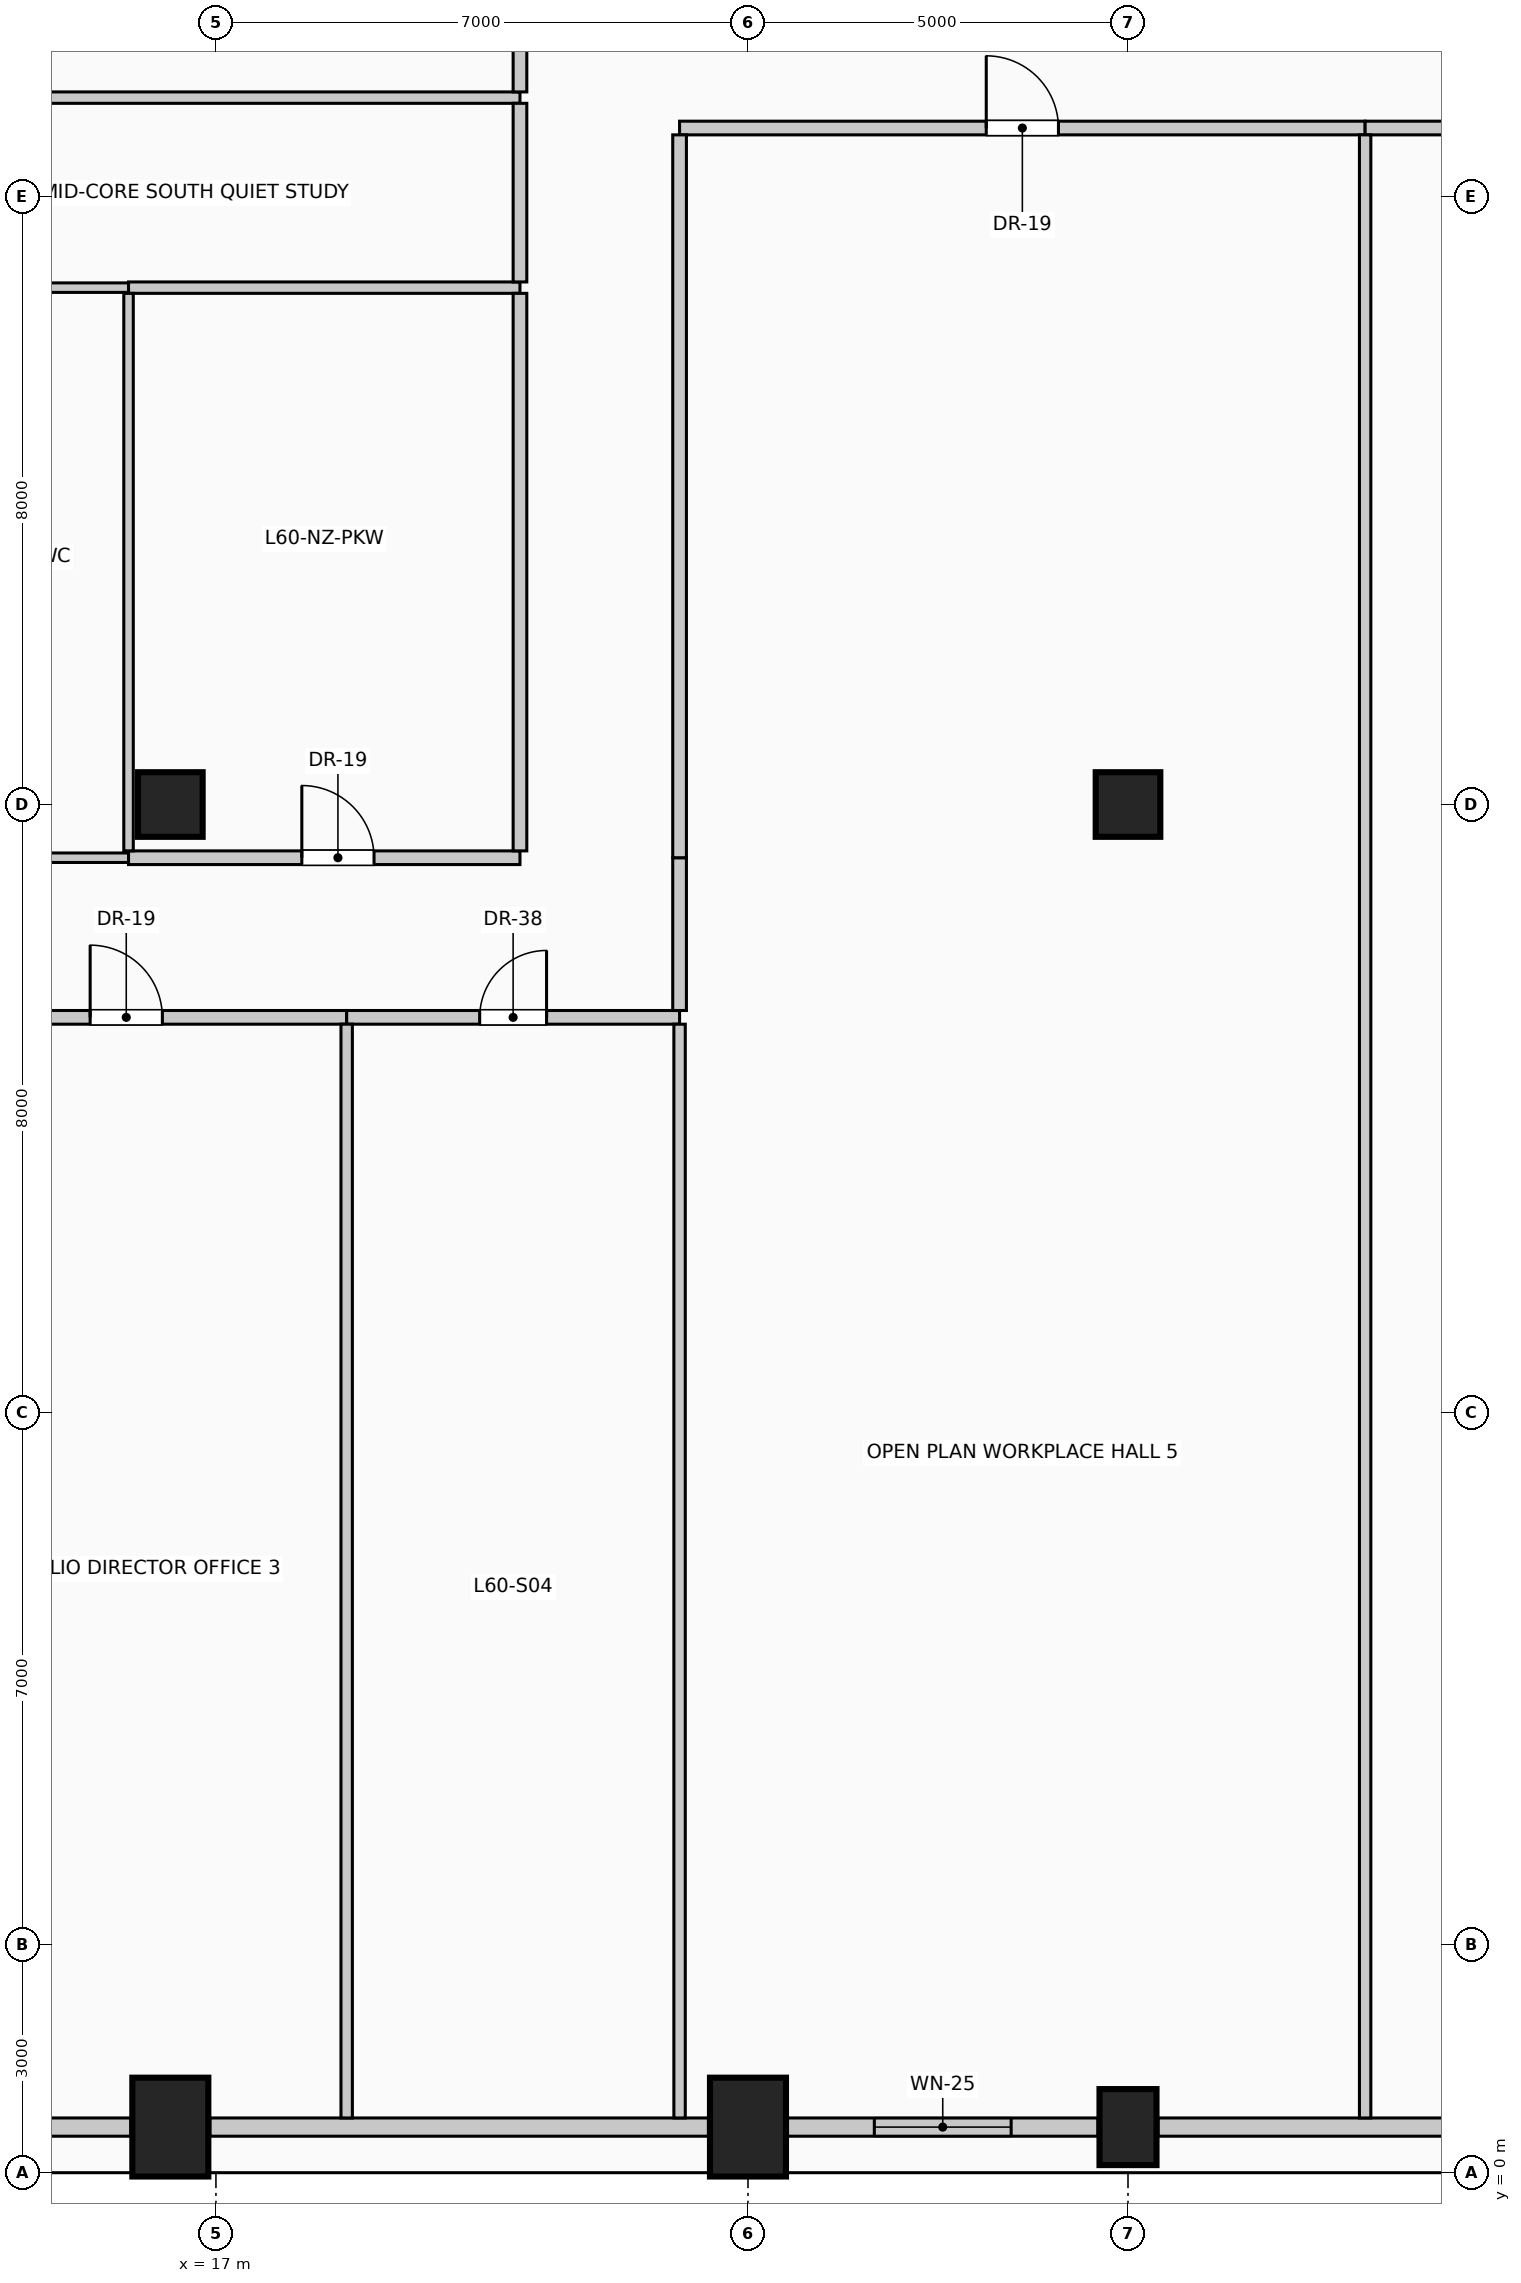
"""IFC4 building model, lengths in metres.
Left out: names, types, materials, properties, quantities, classifications, styles, units other than length and angle.
Written with IfcOpenShell. Run it as: python <this file> out.ifc"""

import sys

from ifc_helpers import new_model, si_unit, direction, frame, frame_2d, origin, origin_2d, place, context, subcontext, project, spatial, rectangle, circle, extrude, element, fill, save


model = new_model("IFC4")
c1 = context("Model", 3, precision=1e-05, world=origin(), true_north=direction((0.0, 1.0)))
c2 = subcontext(c1, "Body", "Model", "MODEL_VIEW")
j1 = project(units=[si_unit("LENGTHUNIT", "METRE"), si_unit("PLANEANGLEUNIT", "RADIAN")], contexts=[c1])
p1 = place(None, origin())
s1 = spatial("IfcSite", under=j1, at=p1, CompositionType="ELEMENT")
p2 = place(p1, origin())
s2 = spatial("IfcBuilding", under=s1, at=p2, CompositionType="ELEMENT")
p3 = place(p2, frame((0.0, 0.0, 248.6)))
s3 = spatial("IfcBuildingStorey", under=s2, at=p3, CompositionType="ELEMENT", Elevation=248.6)
for number, where, z_axis, x_axis in (
    (1, (16.4, 0.6, 0.0), (0.0, 0.0, 1.0), (1.0, 0.0, 0.0)),
    (2, (24.0, 0.6, 0.0), (0.0, 0.0, 1.0), (1.0, 0.0, 0.0)),
):
    element("IfcColumn", number, at=place(p3, frame(where, z_axis=z_axis, x_axis=x_axis)), inside=s3, PredefinedType="COLUMN", context=c2, shape_type="SweptSolid", body=[
        extrude(rectangle(XDim=1.0, YDim=1.3, at=origin_2d()), origin(), (0.0, 0.0, 1.0), 4.0),
    ])
p4 = place(p3, frame((29.0, 0.6, 0.0), z_axis=(0.0, 0.0, 1.0), x_axis=(1.0, 0.0, 0.0)))
e3 = element("IfcColumn", 3, at=p4, inside=s3, PredefinedType="COLUMN", context=c2, shape_type="SweptSolid", body=[
    extrude(rectangle(XDim=0.75, YDim=1.0, at=origin_2d()), origin(), (0.0, 0.0, 1.0), 4.0),
])
for number, where, z_axis, x_axis in (
    (4, (16.4, 18.0, 0.0), (0.0, 0.0, 1.0), (1.0, 0.0, 0.0)),
    (5, (29.0, 18.0, 0.0), (0.0, 0.0, 1.0), (1.0, 0.0, 0.0)),
):
    element("IfcColumn", number, at=place(p3, frame(where, z_axis=z_axis, x_axis=x_axis)), inside=s3, PredefinedType="COLUMN", context=c2, shape_type="SweptSolid", body=[
        extrude(circle(Radius=0.425, at=origin_2d()), origin(), (0.0, 0.0, 1.0), 4.0),
    ])
p5 = place(p3, frame((15.88, 0.6, 0.0), z_axis=(0.0, 0.0, 1.0), x_axis=(-1.0, 0.0, 0.0)))
e6 = element("IfcWall", 6, at=p5, inside=s3, PredefinedType="SOLIDWALL", context=c2, shape_type="SweptSolid", body=[
    extrude(rectangle(XDim=1.485, YDim=0.24, at=frame_2d((0.742, 0.0))), origin(), (0.0, 0.0, 1.0), 3.0),
])
p6 = place(p3, frame((23.48, 0.6, 0.0), z_axis=(0.0, 0.0, 1.0), x_axis=(-1.0, 0.0, 0.0)))
e7 = element("IfcWall", 7, at=p6, inside=s3, PredefinedType="SOLIDWALL", context=c2, shape_type="SweptSolid", body=[
    extrude(rectangle(XDim=6.56, YDim=0.24, at=frame_2d((3.28, 0.0))), origin(), (0.0, 0.0, 1.0), 3.0),
])
p7 = place(p3, frame((28.605, 0.6, 0.0), z_axis=(0.0, 0.0, 1.0), x_axis=(-1.0, 0.0, 0.0)))
e8 = element("IfcWall", 8, at=p7, inside=s3, PredefinedType="SOLIDWALL", context=c2, shape_type="SweptSolid", body=[
    extrude(rectangle(XDim=4.085, YDim=0.24, at=frame_2d((2.042, 0.0))), origin(), (0.0, 0.0, 1.0), 3.0),
])
p8 = place(p7, frame((1.143, 0.0, 0.42)))
e9 = element("IfcOpeningElement", 9, at=p8, cuts=e8, PredefinedType="OPENING", context=c2, shape_type="SweptSolid", body=[
    extrude(rectangle(XDim=1.8, YDim=2.2, at=frame_2d((0.9, 1.1))), frame((0.0, 0.13, 0.0), z_axis=(0.0, -1.0, 0.0), x_axis=(1.0, 0.0, 0.0)), (0.0, 0.0, 1.0), 0.26),
])
p9 = place(p3, frame((33.48, 0.6, 0.0), z_axis=(0.0, 0.0, 1.0), x_axis=(-1.0, 0.0, 0.0)))
e10 = element("IfcWall", 10, at=p9, inside=s3, PredefinedType="SOLIDWALL", context=c2, shape_type="SweptSolid", body=[
    extrude(rectangle(XDim=4.085, YDim=0.24, at=frame_2d((2.042, 0.0))), origin(), (0.0, 0.0, 1.0), 3.0),
])
p10 = place(p3, frame((12.92, 15.2, 0.0), z_axis=(0.0, 0.0, 1.0), x_axis=(1.0, 0.0, 0.0)))
e11 = element("IfcWall", 11, at=p10, inside=s3, PredefinedType="PARTITIONING", context=c2, shape_type="SweptSolid", body=[
    extrude(rectangle(XDim=5.8, YDim=0.18, at=frame_2d((2.9, 0.0))), origin(), (0.0, 0.0, 1.0), 3.75),
])
p11 = place(p10, frame((2.425, 0.0, 0.0)))
e12 = element("IfcOpeningElement", 12, at=p11, cuts=e11, PredefinedType="OPENING", context=c2, shape_type="SweptSolid", body=[
    extrude(rectangle(XDim=0.95, YDim=2.15, at=frame_2d((0.475, 1.075))), frame((0.0, 0.1, 0.0), z_axis=(0.0, -1.0, 0.0), x_axis=(1.0, 0.0, 0.0)), (0.0, 0.0, 1.0), 0.2),
])
p12 = place(p3, frame((18.72, 15.2, 0.0), z_axis=(0.0, 0.0, 1.0), x_axis=(1.0, 0.0, 0.0)))
e13 = element("IfcWall", 13, at=p12, inside=s3, PredefinedType="PARTITIONING", context=c2, shape_type="SweptSolid", body=[
    extrude(rectangle(XDim=4.38, YDim=0.18, at=frame_2d((2.19, 0.0))), origin(), (0.0, 0.0, 1.0), 3.75),
])
p13 = place(p12, frame((1.75, 0.0, 0.0)))
e14 = element("IfcOpeningElement", 14, at=p13, cuts=e13, PredefinedType="OPENING", context=c2, shape_type="SweptSolid", body=[
    extrude(rectangle(XDim=0.88, YDim=2.1, at=frame_2d((0.44, 1.05))), frame((0.0, 0.1, 0.0), z_axis=(0.0, -1.0, 0.0), x_axis=(1.0, 0.0, 0.0)), (0.0, 0.0, 1.0), 0.2),
])
p14 = place(p3, frame((9.8, 17.3, 0.0), z_axis=(0.0, 0.0, 1.0), x_axis=(1.0, 0.0, 0.0)))
e15 = element("IfcWall", 15, at=p14, inside=s3, PredefinedType="PARTITIONING", context=c2, shape_type="SweptSolid", body=[
    extrude(rectangle(XDim=6.05, YDim=0.125, at=frame_2d((3.025, 0.0))), origin(), (0.0, 0.0, 1.0), 3.75),
])
p15 = place(p14, frame((2.575, 0.0, 0.0)))
e16 = element("IfcOpeningElement", 16, at=p15, cuts=e15, PredefinedType="OPENING", context=c2, shape_type="SweptSolid", body=[
    extrude(rectangle(XDim=0.9, YDim=2.1, at=frame_2d((0.45, 1.05))), frame((0.0, 0.073, 0.0), z_axis=(0.0, -1.0, 0.0), x_axis=(1.0, 0.0, 0.0)), (0.0, 0.0, 1.0), 0.145),
])
p16 = place(p3, frame((15.85, 17.3, 0.0), z_axis=(0.0, 0.0, 1.0), x_axis=(1.0, 0.0, 0.0)))
e17 = element("IfcWall", 17, at=p16, inside=s3, PredefinedType="PARTITIONING", context=c2, shape_type="SweptSolid", body=[
    extrude(rectangle(XDim=5.15, YDim=0.18, at=frame_2d((2.575, 0.0))), origin(), (0.0, 0.0, 1.0), 3.75),
])
p17 = place(p16, frame((2.28, 0.0, 0.0)))
e18 = element("IfcOpeningElement", 18, at=p17, cuts=e17, PredefinedType="OPENING", context=c2, shape_type="SweptSolid", body=[
    extrude(rectangle(XDim=0.95, YDim=2.15, at=frame_2d((0.475, 1.075))), frame((0.0, 0.1, 0.0), z_axis=(0.0, -1.0, 0.0), x_axis=(1.0, 0.0, 0.0)), (0.0, 0.0, 1.0), 0.2),
])
p18 = place(p3, frame((12.2, 24.8, 0.0), z_axis=(0.0, 0.0, 1.0), x_axis=(1.0, 0.0, 0.0)))
e19 = element("IfcWall", 19, at=p18, inside=s3, PredefinedType="PARTITIONING", context=c2, shape_type="SweptSolid", body=[
    extrude(rectangle(XDim=3.65, YDim=0.125, at=frame_2d((1.825, 0.0))), origin(), (0.0, 0.0, 1.0), 3.75),
])
p19 = place(p3, frame((15.85, 24.8, 0.0), z_axis=(0.0, 0.0, 1.0), x_axis=(1.0, 0.0, 0.0)))
e20 = element("IfcWall", 20, at=p19, inside=s3, PredefinedType="PARTITIONING", context=c2, shape_type="SweptSolid", body=[
    extrude(rectangle(XDim=5.15, YDim=0.15, at=frame_2d((2.575, 0.0))), origin(), (0.0, 0.0, 1.0), 3.75),
])
p20 = place(p3, frame((23.1, 26.9, 0.0), z_axis=(0.0, 0.0, 1.0), x_axis=(1.0, 0.0, 0.0)))
e21 = element("IfcWall", 21, at=p20, inside=s3, PredefinedType="PARTITIONING", context=c2, shape_type="SweptSolid", body=[
    extrude(rectangle(XDim=9.02, YDim=0.18, at=frame_2d((4.51, 0.0))), origin(), (0.0, 0.0, 1.0), 3.75),
])
p21 = place(p20, frame((4.035, 0.0, 0.0)))
e22 = element("IfcOpeningElement", 22, at=p21, cuts=e21, PredefinedType="OPENING", context=c2, shape_type="SweptSolid", body=[
    extrude(rectangle(XDim=0.95, YDim=2.15, at=frame_2d((0.475, 1.075))), frame((0.0, 0.1, 0.0), z_axis=(0.0, -1.0, 0.0), x_axis=(1.0, 0.0, 0.0)), (0.0, 0.0, 1.0), 0.2),
])
p22 = place(p3, frame((32.12, 26.9, 0.0), z_axis=(0.0, 0.0, 1.0), x_axis=(1.0, 0.0, 0.0)))
e23 = element("IfcWall", 23, at=p22, inside=s3, PredefinedType="PARTITIONING", context=c2, shape_type="SweptSolid", body=[
    extrude(rectangle(XDim=9.2, YDim=0.18, at=frame_2d((4.6, 0.0))), origin(), (0.0, 0.0, 1.0), 3.75),
])
p23 = place(p22, frame((4.075, 0.0, 0.0)))
e24 = element("IfcOpeningElement", 24, at=p23, cuts=e23, PredefinedType="OPENING", context=c2, shape_type="SweptSolid", body=[
    extrude(rectangle(XDim=1.05, YDim=2.15, at=frame_2d((0.525, 1.075))), frame((0.0, 0.1, 0.0), z_axis=(0.0, -1.0, 0.0), x_axis=(1.0, 0.0, 0.0)), (0.0, 0.0, 1.0), 0.2),
])
p24 = place(p3, frame((12.2, 27.3, 0.0), z_axis=(0.0, 0.0, 1.0), x_axis=(1.0, 0.0, 0.0)))
e25 = element("IfcWall", 25, at=p24, inside=s3, PredefinedType="PARTITIONING", context=c2, shape_type="SweptSolid", body=[
    extrude(rectangle(XDim=8.8, YDim=0.15, at=frame_2d((4.4, 0.0))), origin(), (0.0, 0.0, 1.0), 3.75),
])
p25 = place(p3, frame((15.85, 17.39, 0.0), z_axis=(0.0, 0.0, 1.0), x_axis=(0.0, 1.0, 0.0)))
e26 = element("IfcWall", 26, at=p25, inside=s3, PredefinedType="PARTITIONING", context=c2, shape_type="SweptSolid", body=[
    extrude(rectangle(XDim=7.335, YDim=0.125, at=frame_2d((3.667, 0.0))), origin(), (0.0, 0.0, 1.0), 3.75),
])
p26 = place(p3, frame((18.72, 0.72, 0.0), z_axis=(0.0, 0.0, 1.0), x_axis=(0.0, 1.0, 0.0)))
e27 = element("IfcWall", 27, at=p26, inside=s3, PredefinedType="PARTITIONING", context=c2, shape_type="SweptSolid", body=[
    extrude(rectangle(XDim=14.39, YDim=0.15, at=frame_2d((7.195, 0.0))), origin(), (0.0, 0.0, 1.0), 3.75),
])
p27 = place(p3, frame((21.0, 17.39, 0.0), z_axis=(0.0, 0.0, 1.0), x_axis=(0.0, 1.0, 0.0)))
e28 = element("IfcWall", 28, at=p27, inside=s3, PredefinedType="PARTITIONING", context=c2, shape_type="SweptSolid", body=[
    extrude(rectangle(XDim=7.335, YDim=0.18, at=frame_2d((3.667, 0.0))), origin(), (0.0, 0.0, 1.0), 3.75),
])
p28 = place(p3, frame((21.0, 24.875, 0.0), z_axis=(0.0, 0.0, 1.0), x_axis=(0.0, 1.0, 0.0)))
e29 = element("IfcWall", 29, at=p28, inside=s3, PredefinedType="PARTITIONING", context=c2, shape_type="SweptSolid", body=[
    extrude(rectangle(XDim=2.35, YDim=0.18, at=frame_2d((1.175, 0.0))), origin(), (0.0, 0.0, 1.0), 3.75),
])
p29 = place(p3, frame((21.0, 27.375, 0.0), z_axis=(0.0, 0.0, 1.0), x_axis=(0.0, 1.0, 0.0)))
e30 = element("IfcWall", 30, at=p29, inside=s3, PredefinedType="PARTITIONING", context=c2, shape_type="SweptSolid", body=[
    extrude(rectangle(XDim=2.4, YDim=0.18, at=frame_2d((1.2, 0.0))), origin(), (0.0, 0.0, 1.0), 3.75),
])
p30 = place(p29, frame((0.725, 0.0, 0.0)))
e31 = element("IfcOpeningElement", 31, at=p30, cuts=e30, PredefinedType="OPENING", context=c2, shape_type="SweptSolid", body=[
    extrude(rectangle(XDim=0.95, YDim=2.15, at=frame_2d((0.475, 1.075))), frame((0.0, 0.1, 0.0), z_axis=(0.0, -1.0, 0.0), x_axis=(1.0, 0.0, 0.0)), (0.0, 0.0, 1.0), 0.2),
])
p31 = place(p3, frame((23.1, 0.72, 0.0), z_axis=(0.0, 0.0, 1.0), x_axis=(0.0, 1.0, 0.0)))
e32 = element("IfcWall", 32, at=p31, inside=s3, PredefinedType="PARTITIONING", context=c2, shape_type="SweptSolid", body=[
    extrude(rectangle(XDim=14.39, YDim=0.15, at=frame_2d((7.195, 0.0))), origin(), (0.0, 0.0, 1.0), 3.75),
])
p32 = place(p3, frame((23.1, 15.29, 0.0), z_axis=(0.0, 0.0, 1.0), x_axis=(0.0, 1.0, 0.0)))
e33 = element("IfcWall", 33, at=p32, inside=s3, PredefinedType="PARTITIONING", context=c2, shape_type="SweptSolid", body=[
    extrude(rectangle(XDim=2.01, YDim=0.18, at=frame_2d((1.005, 0.0))), origin(), (0.0, 0.0, 1.0), 3.75),
])
p33 = place(p3, frame((23.1, 17.3, 0.0), z_axis=(0.0, 0.0, 1.0), x_axis=(0.0, 1.0, 0.0)))
e34 = element("IfcWall", 34, at=p33, inside=s3, PredefinedType="PARTITIONING", context=c2, shape_type="SweptSolid", body=[
    extrude(rectangle(XDim=9.51, YDim=0.18, at=frame_2d((4.755, 0.0))), origin(), (0.0, 0.0, 1.0), 3.75),
])
p34 = place(p3, frame((32.12, 0.72, 0.0), z_axis=(0.0, 0.0, 1.0), x_axis=(0.0, 1.0, 0.0)))
e35 = element("IfcWall", 35, at=p34, inside=s3, PredefinedType="PARTITIONING", context=c2, shape_type="SweptSolid", body=[
    extrude(rectangle(XDim=26.09, YDim=0.15, at=frame_2d((13.045, 0.0))), origin(), (0.0, 0.0, 1.0), 3.75),
])
p35 = place(p8, origin())
e36 = element("IfcWindow", 36, at=p35, inside=s3, PartitioningType="SINGLE_PANEL", PredefinedType="WINDOW", context=c2, shape_type="SweptSolid", body=[
    extrude(rectangle(XDim=1.8, YDim=2.2, at=frame_2d((0.9, 1.1))), frame((0.0, 0.03, 0.0), z_axis=(0.0, -1.0, 0.0), x_axis=(1.0, 0.0, 0.0)), (0.0, 0.0, 1.0), 0.06),
])
fill(e9, e36)
p36 = place(p11, origin())
e37 = element("IfcDoor", 37, at=p36, inside=s3, OperationType="SINGLE_SWING_LEFT", PredefinedType="DOOR", context=c2, shape_type="SweptSolid", body=[
    extrude(rectangle(XDim=0.95, YDim=2.15, at=frame_2d((0.475, 1.075))), frame((0.0, 0.025, 0.0), z_axis=(0.0, -1.0, 0.0), x_axis=(1.0, 0.0, 0.0)), (0.0, 0.0, 1.0), 0.05),
])
fill(e12, e37)
p37 = place(p13, origin())
e38 = element("IfcDoor", 38, at=p37, inside=s3, OperationType="SINGLE_SWING_RIGHT", PredefinedType="DOOR", context=c2, shape_type="SweptSolid", body=[
    extrude(rectangle(XDim=0.88, YDim=2.1, at=frame_2d((0.44, 1.05))), frame((0.0, 0.025, 0.0), z_axis=(0.0, -1.0, 0.0), x_axis=(1.0, 0.0, 0.0)), (0.0, 0.0, 1.0), 0.05),
])
fill(e14, e38)
p38 = place(p17, origin())
e39 = element("IfcDoor", 39, at=p38, inside=s3, OperationType="SINGLE_SWING_LEFT", PredefinedType="DOOR", context=c2, shape_type="SweptSolid", body=[
    extrude(rectangle(XDim=0.95, YDim=2.15, at=frame_2d((0.475, 1.075))), frame((0.0, 0.025, 0.0), z_axis=(0.0, -1.0, 0.0), x_axis=(1.0, 0.0, 0.0)), (0.0, 0.0, 1.0), 0.05),
])
fill(e18, e39)
p39 = place(p21, origin())
e40 = element("IfcDoor", 40, at=p39, inside=s3, OperationType="SINGLE_SWING_LEFT", PredefinedType="DOOR", context=c2, shape_type="SweptSolid", body=[
    extrude(rectangle(XDim=0.95, YDim=2.15, at=frame_2d((0.475, 1.075))), frame((0.0, 0.025, 0.0), z_axis=(0.0, -1.0, 0.0), x_axis=(1.0, 0.0, 0.0)), (0.0, 0.0, 1.0), 0.05),
])
fill(e22, e40)
save(model, sys.argv[1])
